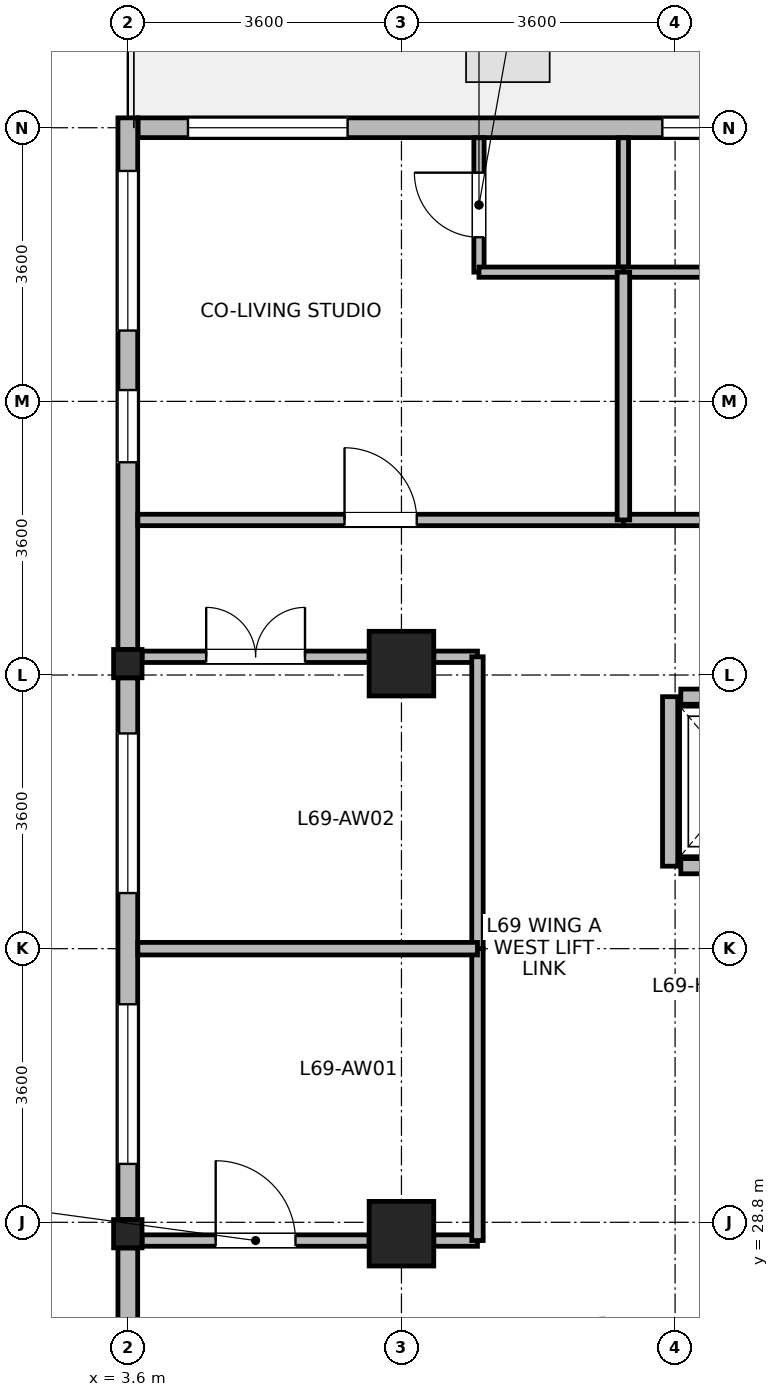
"""IFC4 building model, lengths in metres.
Left out: names, types, materials, properties, quantities, classifications, styles, units other than length and angle.
Written with IfcOpenShell. Run it as: python <this file> out.ifc"""

import sys

from ifc_helpers import new_model, si_unit, direction, frame, frame_2d, origin, origin_2d, place, context, subcontext, project, spatial, rectangle, i_section, extrude, source, transform, mapped, element, fill, save


model = new_model("IFC4")
c1 = context("Model", 3, precision=1e-05, world=origin(), true_north=direction((0.0, 1.0)))
c2 = subcontext(c1, "Body", "Model", "MODEL_VIEW")
j1 = project(units=[si_unit("LENGTHUNIT", "METRE"), si_unit("PLANEANGLEUNIT", "RADIAN")], contexts=[c1])
p1 = place(None, origin())
s1 = spatial("IfcSite", under=j1, at=p1, CompositionType="ELEMENT")
p2 = place(p1, origin())
s2 = spatial("IfcBuilding", under=s1, at=p2, CompositionType="ELEMENT")
p3 = place(p2, frame((0.0, 0.0, 268.4)))
s3 = spatial("IfcBuildingStorey", under=s2, at=p3, CompositionType="ELEMENT", Elevation=268.4)
m1 = source(origin(), c2, "Body", "SweptSolid", [
    extrude(rectangle(XDim=0.85, YDim=0.85, at=origin_2d()), origin(), (0.0, 0.0, 1.0), 3.7),
])
for number, where, z_axis, x_axis in (
    (1, (7.2, 28.65, 0.0), (0.0, 0.0, 1.0), (1.0, 0.0, 0.0)),
    (2, (7.2, 36.15, 0.0), (0.0, 0.0, 1.0), (1.0, 0.0, 0.0)),
):
    element("IfcColumn", number, at=place(p3, frame(where, z_axis=z_axis, x_axis=x_axis)), inside=s3, PredefinedType="COLUMN", context=c2, shape_type="MappedRepresentation", body=[
        mapped(m1, transform((0.0, 0.0, 0.0), x_axis=(1.0, 0.0, 0.0), y_axis=(0.0, 1.0, 0.0), z_axis=(0.0, 0.0, 1.0), scale=1.0)),
    ])
m2 = source(origin(), c2, "Body", "SweptSolid", [
    extrude(i_section(OverallWidth=0.374, OverallDepth=0.372, WebThickness=0.015, FlangeThickness=0.026, FilletRadius=0.015, at=origin_2d()), origin(), (0.0, 0.0, 1.0), 3.7),
])
for number, where, z_axis, x_axis in (
    (3, (3.6, 28.65, 0.0), (0.0, 0.0, 1.0), (1.0, 0.0, 0.0)),
    (4, (3.6, 36.15, 0.0), (0.0, 0.0, 1.0), (1.0, 0.0, 0.0)),
):
    element("IfcColumn", number, at=place(p3, frame(where, z_axis=z_axis, x_axis=x_axis)), inside=s3, PredefinedType="COLUMN", context=c2, shape_type="MappedRepresentation", body=[
        mapped(m2, transform((0.0, 0.0, 0.0), x_axis=(1.0, 0.0, 0.0), y_axis=(0.0, 1.0, 0.0), z_axis=(0.0, 0.0, 1.0), scale=1.0)),
    ])
p4 = place(p3, frame((3.735, 43.2, 0.0), z_axis=(0.0, 0.0, 1.0), x_axis=(1.0, 0.0, 0.0)))
e5 = element("IfcWall", 5, at=p4, inside=s3, PredefinedType="STANDARD", context=c2, shape_type="SweptSolid", body=[
    extrude(rectangle(XDim=10.239, YDim=0.26, at=frame_2d((5.12, 0.0))), origin(), (0.0, 0.0, 1.0), 3.455),
])
p5 = place(p4, frame((0.656, 0.0, 0.85)))
e6 = element("IfcOpeningElement", 6, at=p5, cuts=e5, PredefinedType="OPENING", context=c2, shape_type="SweptSolid", body=[
    extrude(rectangle(XDim=2.1, YDim=1.95, at=frame_2d((1.05, 0.975))), frame((0.0, 0.14, 0.0), z_axis=(0.0, -1.0, 0.0), x_axis=(1.0, 0.0, 0.0)), (0.0, 0.0, 1.0), 0.28),
])
p6 = place(p4, frame((6.897, 0.0, 0.85)))
e7 = element("IfcOpeningElement", 7, at=p6, cuts=e5, PredefinedType="OPENING", context=c2, shape_type="SweptSolid", body=[
    extrude(rectangle(XDim=0.95, YDim=1.75, at=frame_2d((0.475, 0.875))), frame((0.0, 0.14, 0.0), z_axis=(0.0, -1.0, 0.0), x_axis=(1.0, 0.0, 0.0)), (0.0, 0.0, 1.0), 0.28),
])
p7 = place(p3, frame((3.6, 36.337, 0.0), z_axis=(0.0, 0.0, 1.0), x_axis=(0.0, 1.0, 0.0)))
e8 = element("IfcWall", 8, at=p7, inside=s3, PredefinedType="STANDARD", context=c2, shape_type="SweptSolid", body=[
    extrude(rectangle(XDim=6.993, YDim=0.26, at=frame_2d((3.497, 0.0))), origin(), (0.0, 0.0, 1.0), 3.455),
])
p8 = place(p7, frame((4.195, 0.0, 0.85)))
e9 = element("IfcOpeningElement", 9, at=p8, cuts=e8, PredefinedType="OPENING", context=c2, shape_type="SweptSolid", body=[
    extrude(rectangle(XDim=2.1, YDim=1.95, at=frame_2d((1.05, 0.975))), frame((0.0, 0.14, 0.0), z_axis=(0.0, -1.0, 0.0), x_axis=(1.0, 0.0, 0.0)), (0.0, 0.0, 1.0), 0.28),
])
p9 = place(p7, frame((2.462, 0.0, 0.85)))
e10 = element("IfcOpeningElement", 10, at=p9, cuts=e8, PredefinedType="OPENING", context=c2, shape_type="SweptSolid", body=[
    extrude(rectangle(XDim=0.95, YDim=1.75, at=frame_2d((0.475, 0.875))), frame((0.0, 0.14, 0.0), z_axis=(0.0, -1.0, 0.0), x_axis=(1.0, 0.0, 0.0)), (0.0, 0.0, 1.0), 0.28),
])
p10 = place(p3, frame((3.6, 28.837, 0.0), z_axis=(0.0, 0.0, 1.0), x_axis=(0.0, 1.0, 0.0)))
e11 = element("IfcWall", 11, at=p10, inside=s3, PredefinedType="STANDARD", context=c2, shape_type="SweptSolid", body=[
    extrude(rectangle(XDim=7.126, YDim=0.26, at=frame_2d((3.563, 0.0))), origin(), (0.0, 0.0, 1.0), 3.055),
])
p11 = place(p10, frame((0.731, 0.0, 0.85)))
e12 = element("IfcOpeningElement", 12, at=p11, cuts=e11, PredefinedType="OPENING", context=c2, shape_type="SweptSolid", body=[
    extrude(rectangle(XDim=2.1, YDim=1.95, at=frame_2d((1.05, 0.975))), frame((0.0, 0.14, 0.0), z_axis=(0.0, -1.0, 0.0), x_axis=(1.0, 0.0, 0.0)), (0.0, 0.0, 1.0), 0.28),
])
p12 = place(p10, frame((4.294, 0.0, 0.85)))
e13 = element("IfcOpeningElement", 13, at=p12, cuts=e11, PredefinedType="OPENING", context=c2, shape_type="SweptSolid", body=[
    extrude(rectangle(XDim=2.1, YDim=1.95, at=frame_2d((1.05, 0.975))), frame((0.0, 0.14, 0.0), z_axis=(0.0, -1.0, 0.0), x_axis=(1.0, 0.0, 0.0)), (0.0, 0.0, 1.0), 0.28),
])
p13 = place(p3, frame((3.6, 21.47, 0.0), z_axis=(0.0, 0.0, 1.0), x_axis=(0.0, 1.0, 0.0)))
e14 = element("IfcWall", 14, at=p13, inside=s3, PredefinedType="STANDARD", context=c2, shape_type="SweptSolid", body=[
    extrude(rectangle(XDim=6.993, YDim=0.26, at=frame_2d((3.497, 0.0))), origin(), (0.0, 0.0, 1.0), 3.455),
])
p14 = place(p13, frame((3.021, 0.0, 0.85)))
e15 = element("IfcOpeningElement", 15, at=p14, cuts=e14, PredefinedType="OPENING", context=c2, shape_type="SweptSolid", body=[
    extrude(rectangle(XDim=0.95, YDim=1.75, at=frame_2d((0.475, 0.875))), frame((0.0, 0.14, 0.0), z_axis=(0.0, -1.0, 0.0), x_axis=(1.0, 0.0, 0.0)), (0.0, 0.0, 1.0), 0.28),
])
p15 = place(p3, frame((10.875, 33.485, 0.0), z_axis=(0.0, 0.0, 1.0), x_axis=(1.0, 0.0, 0.0)))
e16 = element("IfcWall", 16, at=p15, inside=s3, PredefinedType="PARTITIONING", context=c2, shape_type="SweptSolid", body=[
    extrude(rectangle(XDim=1.65, YDim=0.2, at=frame_2d((0.825, 0.0))), origin(), (0.0, 0.0, 1.0), 3.455),
])
p16 = place(p15, frame((0.275, 0.0, 0.0)))
e17 = element("IfcOpeningElement", 17, at=p16, cuts=e16, PredefinedType="OPENING", context=c2, shape_type="SweptSolid", body=[
    extrude(rectangle(XDim=1.1, YDim=2.12, at=frame_2d((0.55, 1.06))), frame((0.0, 0.11, 0.0), z_axis=(0.0, -1.0, 0.0), x_axis=(1.0, 0.0, 0.0)), (0.0, 0.0, 1.0), 0.22),
])
p17 = place(p3, frame((10.875, 35.715, 0.0), z_axis=(0.0, 0.0, 1.0), x_axis=(1.0, 0.0, 0.0)))
e18 = element("IfcWall", 18, at=p17, inside=s3, PredefinedType="PARTITIONING", context=c2, shape_type="SweptSolid", body=[
    extrude(rectangle(XDim=1.65, YDim=0.2, at=frame_2d((0.825, 0.0))), origin(), (0.0, 0.0, 1.0), 3.455),
])
p18 = place(p3, frame((10.735, 33.485, 0.0), z_axis=(0.0, 0.0, 1.0), x_axis=(0.0, 1.0, 0.0)))
e19 = element("IfcWall", 19, at=p18, inside=s3, PredefinedType="PARTITIONING", context=c2, shape_type="SweptSolid", body=[
    extrude(rectangle(XDim=2.23, YDim=0.2, at=frame_2d((1.115, 0.0))), origin(), (0.0, 0.0, 1.0), 3.455),
])
p19 = place(p3, frame((8.22, 41.3, 0.0), z_axis=(0.0, 0.0, 1.0), x_axis=(0.0, 1.0, 0.0)))
e20 = element("IfcWall", 20, at=p19, inside=s3, PredefinedType="PARTITIONING", context=c2, shape_type="SweptSolid", body=[
    extrude(rectangle(XDim=1.768, YDim=0.135, at=frame_2d((0.884, 0.0))), origin(), (0.0, 0.0, 1.0), 3.455),
])
p20 = place(p19, frame((0.459, 0.0, 0.0)))
e21 = element("IfcOpeningElement", 21, at=p20, cuts=e20, PredefinedType="OPENING", context=c2, shape_type="SweptSolid", body=[
    extrude(rectangle(XDim=0.85, YDim=2.04, at=frame_2d((0.425, 1.02))), frame((0.0, 0.078, 0.0), z_axis=(0.0, -1.0, 0.0), x_axis=(1.0, 0.0, 0.0)), (0.0, 0.0, 1.0), 0.155),
])
p21 = place(p3, frame((10.12, 41.3, 0.0), z_axis=(0.0, 0.0, 1.0), x_axis=(0.0, 1.0, 0.0)))
e22 = element("IfcWall", 22, at=p21, inside=s3, PredefinedType="PARTITIONING", context=c2, shape_type="SweptSolid", body=[
    extrude(rectangle(XDim=1.768, YDim=0.135, at=frame_2d((0.884, 0.0))), origin(), (0.0, 0.0, 1.0), 3.455),
])
p22 = place(p3, frame((10.12, 41.3, 0.0), z_axis=(0.0, 0.0, 1.0), x_axis=(1.0, 0.0, 0.0)))
e23 = element("IfcWall", 23, at=p22, inside=s3, PredefinedType="PARTITIONING", context=c2, shape_type="SweptSolid", body=[
    extrude(rectangle(XDim=1.9, YDim=0.135, at=frame_2d((0.95, 0.0))), origin(), (0.0, 0.0, 1.0), 3.455),
])
p23 = place(p3, frame((8.22, 41.3, 0.0), z_axis=(0.0, 0.0, 1.0), x_axis=(1.0, 0.0, 0.0)))
e24 = element("IfcWall", 24, at=p23, inside=s3, PredefinedType="PARTITIONING", context=c2, shape_type="SweptSolid", body=[
    extrude(rectangle(XDim=1.9, YDim=0.135, at=frame_2d((0.95, 0.0))), origin(), (0.0, 0.0, 1.0), 3.455),
])
p24 = place(p3, frame((10.12, 38.04, 0.0), z_axis=(0.0, 0.0, 1.0), x_axis=(1.0, 0.0, 0.0)))
e25 = element("IfcWall", 25, at=p24, inside=s3, PredefinedType="PARTITIONING", context=c2, shape_type="SweptSolid", body=[
    extrude(rectangle(XDim=7.7, YDim=0.15, at=frame_2d((3.85, 0.0))), origin(), (0.0, 0.0, 1.0), 3.455),
])
p25 = place(p24, frame((3.325, 0.0, 0.0)))
e26 = element("IfcOpeningElement", 26, at=p25, cuts=e25, PredefinedType="OPENING", context=c2, shape_type="SweptSolid", body=[
    extrude(rectangle(XDim=1.05, YDim=2.12, at=frame_2d((0.525, 1.06))), frame((0.0, 0.085, 0.0), z_axis=(0.0, -1.0, 0.0), x_axis=(1.0, 0.0, 0.0)), (0.0, 0.0, 1.0), 0.17),
])
p26 = place(p3, frame((3.732, 38.04, 0.0), z_axis=(0.0, 0.0, 1.0), x_axis=(1.0, 0.0, 0.0)))
e27 = element("IfcWall", 27, at=p26, inside=s3, PredefinedType="PARTITIONING", context=c2, shape_type="SweptSolid", body=[
    extrude(rectangle(XDim=6.388, YDim=0.15, at=frame_2d((3.194, 0.0))), origin(), (0.0, 0.0, 1.0), 3.455),
])
p27 = place(p26, frame((2.719, 0.0, 0.0)))
e28 = element("IfcOpeningElement", 28, at=p27, cuts=e27, PredefinedType="OPENING", context=c2, shape_type="SweptSolid", body=[
    extrude(rectangle(XDim=0.95, YDim=2.1, at=frame_2d((0.475, 1.05))), frame((0.0, 0.085, 0.0), z_axis=(0.0, -1.0, 0.0), x_axis=(1.0, 0.0, 0.0)), (0.0, 0.0, 1.0), 0.17),
])
p28 = place(p3, frame((3.787, 28.56, 0.0), z_axis=(0.0, 0.0, 1.0), x_axis=(1.0, 0.0, 0.0)))
e29 = element("IfcWall", 29, at=p28, inside=s3, PredefinedType="PARTITIONING", context=c2, shape_type="SweptSolid", body=[
    extrude(rectangle(XDim=2.988, YDim=0.15, at=frame_2d((1.494, 0.0))), origin(), (0.0, 0.0, 1.0), 2.905),
])
p29 = place(p28, frame((0.969, 0.0, 0.0)))
e30 = element("IfcOpeningElement", 30, at=p29, cuts=e29, PredefinedType="OPENING", context=c2, shape_type="SweptSolid", body=[
    extrude(rectangle(XDim=1.05, YDim=2.12, at=frame_2d((0.525, 1.06))), frame((0.0, 0.085, 0.0), z_axis=(0.0, -1.0, 0.0), x_axis=(1.0, 0.0, 0.0)), (0.0, 0.0, 1.0), 0.17),
])
p30 = place(p3, frame((7.625, 28.56, 0.0), z_axis=(0.0, 0.0, 1.0), x_axis=(1.0, 0.0, 0.0)))
e31 = element("IfcWall", 31, at=p30, inside=s3, PredefinedType="PARTITIONING", context=c2, shape_type="SweptSolid", body=[
    extrude(rectangle(XDim=0.575, YDim=0.15, at=frame_2d((0.288, 0.0))), origin(), (0.0, 0.0, 1.0), 2.905),
])
p31 = place(p3, frame((3.787, 36.24, 0.0), z_axis=(0.0, 0.0, 1.0), x_axis=(1.0, 0.0, 0.0)))
e32 = element("IfcWall", 32, at=p31, inside=s3, PredefinedType="PARTITIONING", context=c2, shape_type="SweptSolid", body=[
    extrude(rectangle(XDim=2.988, YDim=0.15, at=frame_2d((1.494, 0.0))), origin(), (0.0, 0.0, 1.0), 2.905),
])
p32 = place(p31, frame((0.844, 0.0, 0.0)))
e33 = element("IfcOpeningElement", 33, at=p32, cuts=e32, PredefinedType="OPENING", context=c2, shape_type="SweptSolid", body=[
    extrude(rectangle(XDim=1.3, YDim=2.12, at=frame_2d((0.65, 1.06))), frame((0.0, 0.085, 0.0), z_axis=(0.0, -1.0, 0.0), x_axis=(1.0, 0.0, 0.0)), (0.0, 0.0, 1.0), 0.17),
])
p33 = place(p3, frame((7.625, 36.24, 0.0), z_axis=(0.0, 0.0, 1.0), x_axis=(1.0, 0.0, 0.0)))
e34 = element("IfcWall", 34, at=p33, inside=s3, PredefinedType="PARTITIONING", context=c2, shape_type="SweptSolid", body=[
    extrude(rectangle(XDim=0.575, YDim=0.15, at=frame_2d((0.288, 0.0))), origin(), (0.0, 0.0, 1.0), 2.905),
])
p34 = place(p3, frame((8.2, 32.4, 0.0), z_axis=(0.0, 0.0, 1.0), x_axis=(0.0, 1.0, 0.0)))
e35 = element("IfcWall", 35, at=p34, inside=s3, PredefinedType="PARTITIONING", context=c2, shape_type="SweptSolid", body=[
    extrude(rectangle(XDim=3.84, YDim=0.15, at=frame_2d((1.92, 0.0))), origin(), (0.0, 0.0, 1.0), 3.455),
])
p35 = place(p3, frame((8.2, 28.56, 0.0), z_axis=(0.0, 0.0, 1.0), x_axis=(0.0, 1.0, 0.0)))
e36 = element("IfcWall", 36, at=p35, inside=s3, PredefinedType="PARTITIONING", context=c2, shape_type="SweptSolid", body=[
    extrude(rectangle(XDim=3.84, YDim=0.15, at=frame_2d((1.92, 0.0))), origin(), (0.0, 0.0, 1.0), 3.455),
])
p36 = place(p3, frame((3.732, 32.4, 0.0), z_axis=(0.0, 0.0, 1.0), x_axis=(1.0, 0.0, 0.0)))
e37 = element("IfcWall", 37, at=p36, inside=s3, PredefinedType="PARTITIONING", context=c2, shape_type="SweptSolid", body=[
    extrude(rectangle(XDim=4.468, YDim=0.165, at=frame_2d((2.234, 0.0))), origin(), (0.0, 0.0, 1.0), 3.455),
])
p37 = place(p3, frame((10.12, 38.04, 0.0), z_axis=(0.0, 0.0, 1.0), x_axis=(0.0, 1.0, 0.0)))
e38 = element("IfcWall", 38, at=p37, inside=s3, PredefinedType="PARTITIONING", context=c2, shape_type="SweptSolid", body=[
    extrude(rectangle(XDim=3.26, YDim=0.165, at=frame_2d((1.63, 0.0))), origin(), (0.0, 0.0, 1.0), 3.455),
])
p38 = place(p5, origin())
e39 = element("IfcWindow", 39, at=p38, inside=s3, PartitioningType="SINGLE_PANEL", PredefinedType="WINDOW", context=c2, shape_type="SweptSolid", body=[
    extrude(rectangle(XDim=2.1, YDim=1.95, at=frame_2d((1.05, 0.975))), frame((0.0, 0.03, 0.0), z_axis=(0.0, -1.0, 0.0), x_axis=(1.0, 0.0, 0.0)), (0.0, 0.0, 1.0), 0.06),
])
fill(e6, e39)
p39 = place(p6, origin())
e40 = element("IfcWindow", 40, at=p39, inside=s3, PartitioningType="SINGLE_PANEL", PredefinedType="WINDOW", context=c2, shape_type="SweptSolid", body=[
    extrude(rectangle(XDim=0.95, YDim=1.75, at=frame_2d((0.475, 0.875))), frame((0.0, 0.03, 0.0), z_axis=(0.0, -1.0, 0.0), x_axis=(1.0, 0.0, 0.0)), (0.0, 0.0, 1.0), 0.06),
])
fill(e7, e40)
p40 = place(p8, origin())
e41 = element("IfcWindow", 41, at=p40, inside=s3, PartitioningType="SINGLE_PANEL", PredefinedType="WINDOW", context=c2, shape_type="SweptSolid", body=[
    extrude(rectangle(XDim=2.1, YDim=1.95, at=frame_2d((1.05, 0.975))), frame((0.0, 0.03, 0.0), z_axis=(0.0, -1.0, 0.0), x_axis=(1.0, 0.0, 0.0)), (0.0, 0.0, 1.0), 0.06),
])
fill(e9, e41)
p41 = place(p9, origin())
e42 = element("IfcWindow", 42, at=p41, inside=s3, PartitioningType="SINGLE_PANEL", PredefinedType="WINDOW", context=c2, shape_type="SweptSolid", body=[
    extrude(rectangle(XDim=0.95, YDim=1.75, at=frame_2d((0.475, 0.875))), frame((0.0, 0.03, 0.0), z_axis=(0.0, -1.0, 0.0), x_axis=(1.0, 0.0, 0.0)), (0.0, 0.0, 1.0), 0.06),
])
fill(e10, e42)
p42 = place(p11, origin())
e43 = element("IfcWindow", 43, at=p42, inside=s3, PartitioningType="SINGLE_PANEL", PredefinedType="WINDOW", context=c2, shape_type="SweptSolid", body=[
    extrude(rectangle(XDim=2.1, YDim=1.95, at=frame_2d((1.05, 0.975))), frame((0.0, 0.03, 0.0), z_axis=(0.0, -1.0, 0.0), x_axis=(1.0, 0.0, 0.0)), (0.0, 0.0, 1.0), 0.06),
])
fill(e12, e43)
p43 = place(p12, origin())
e44 = element("IfcWindow", 44, at=p43, inside=s3, PartitioningType="SINGLE_PANEL", PredefinedType="WINDOW", context=c2, shape_type="SweptSolid", body=[
    extrude(rectangle(XDim=2.1, YDim=1.95, at=frame_2d((1.05, 0.975))), frame((0.0, 0.03, 0.0), z_axis=(0.0, -1.0, 0.0), x_axis=(1.0, 0.0, 0.0)), (0.0, 0.0, 1.0), 0.06),
])
fill(e13, e44)
p44 = place(p20, origin())
e45 = element("IfcDoor", 45, at=p44, inside=s3, OperationType="SINGLE_SWING_RIGHT", PredefinedType="DOOR", context=c2, shape_type="SweptSolid", body=[
    extrude(rectangle(XDim=0.85, YDim=2.04, at=frame_2d((0.425, 1.02))), frame((0.0, 0.025, 0.0), z_axis=(0.0, -1.0, 0.0), x_axis=(1.0, 0.0, 0.0)), (0.0, 0.0, 1.0), 0.05),
])
fill(e21, e45)
p45 = place(p27, origin())
e46 = element("IfcDoor", 46, at=p45, inside=s3, OperationType="SINGLE_SWING_LEFT", PredefinedType="DOOR", context=c2, shape_type="SweptSolid", body=[
    extrude(rectangle(XDim=0.95, YDim=2.1, at=frame_2d((0.475, 1.05))), frame((0.0, 0.025, 0.0), z_axis=(0.0, -1.0, 0.0), x_axis=(1.0, 0.0, 0.0)), (0.0, 0.0, 1.0), 0.05),
])
fill(e28, e46)
p46 = place(p29, origin())
e47 = element("IfcDoor", 47, at=p46, inside=s3, OperationType="SINGLE_SWING_LEFT", PredefinedType="DOOR", context=c2, shape_type="SweptSolid", body=[
    extrude(rectangle(XDim=1.05, YDim=2.12, at=frame_2d((0.525, 1.06))), frame((0.0, 0.025, 0.0), z_axis=(0.0, -1.0, 0.0), x_axis=(1.0, 0.0, 0.0)), (0.0, 0.0, 1.0), 0.05),
])
fill(e30, e47)
p47 = place(p32, origin())
e48 = element("IfcDoor", 48, at=p47, inside=s3, OperationType="DOUBLE_DOOR_SINGLE_SWING", PredefinedType="DOOR", context=c2, shape_type="SweptSolid", body=[
    extrude(rectangle(XDim=1.3, YDim=2.12, at=frame_2d((0.65, 1.06))), frame((0.0, 0.025, 0.0), z_axis=(0.0, -1.0, 0.0), x_axis=(1.0, 0.0, 0.0)), (0.0, 0.0, 1.0), 0.05),
])
fill(e33, e48)
save(model, sys.argv[1])
